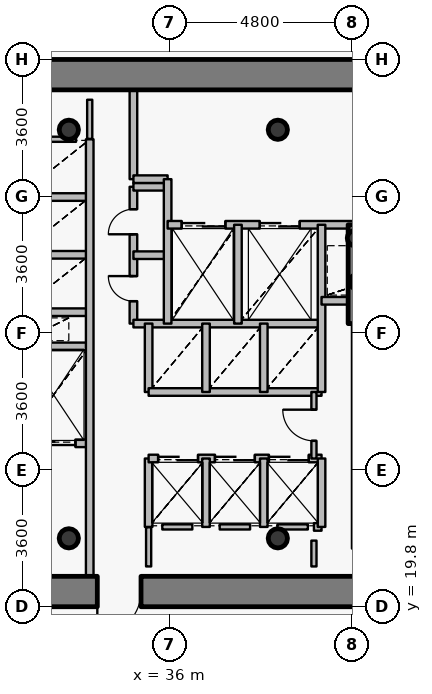
"""IFC4 building model, lengths in metres.
Left out: names, types, materials, properties, quantities, classifications, styles, units other than length and angle.
Written with IfcOpenShell. Run it as: python <this file> out.ifc"""

import sys

from ifc_helpers import new_model, si_unit, direction, frame, frame_2d, origin, origin_2d, place, context, subcontext, project, spatial, rectangle, hollow_circle, extrude, source, transform, mapped, element, fill, save


model = new_model("IFC4")
c1 = context("Model", 3, precision=1e-05, world=origin(), true_north=direction((0.0, 1.0)))
c2 = subcontext(c1, "Body", "Model", "MODEL_VIEW")
j1 = project(units=[si_unit("LENGTHUNIT", "METRE"), si_unit("PLANEANGLEUNIT", "RADIAN")], contexts=[c1])
p1 = place(None, origin())
s1 = spatial("IfcSite", under=j1, at=p1, CompositionType="ELEMENT")
p2 = place(p1, origin())
s2 = spatial("IfcBuilding", under=s1, at=p2, CompositionType="ELEMENT")
p3 = place(p2, frame((0.0, 0.0, 138.45)))
s3 = spatial("IfcBuildingStorey", under=s2, at=p3, CompositionType="ELEMENT", Elevation=138.45)
for number, where, z_axis, x_axis in (
    (1, (33.35, 21.6, 0.0), (0.0, 0.0, 1.0), (1.0, 0.0, 0.0)),
    (2, (38.85, 21.6, 0.0), (0.0, 0.0, 1.0), (1.0, 0.0, 0.0)),
    (3, (38.85, 32.35, 0.0), (0.0, 0.0, 1.0), (1.0, 0.0, 0.0)),
    (4, (33.35, 32.35, 0.0), (0.0, 0.0, 1.0), (1.0, 0.0, 0.0)),
):
    element("IfcColumn", number, at=place(p3, frame(where, z_axis=z_axis, x_axis=x_axis)), inside=s3, PredefinedType="COLUMN", context=c2, shape_type="SweptSolid", body=[
        extrude(hollow_circle(Radius=0.254, WallThickness=0.02, at=origin_2d()), origin(), (0.0, 0.0, 1.0), 3.75),
    ])
for number, where, z_axis, x_axis in (
    (5, (40.95, 28.35, 0.0), (0.0, 0.0, 1.0), (1.0, 0.0, 0.0)),
    (6, (40.88, 29.5, 0.0), (0.0, 0.0, 1.0), (1.0, 0.0, 0.0)),
):
    element("IfcColumn", number, at=place(p3, frame(where, z_axis=z_axis, x_axis=x_axis)), inside=s3, PredefinedType="COLUMN", context=c2, shape_type="SweptSolid", body=[
        extrude(hollow_circle(Radius=0.203, WallThickness=0.016, at=origin_2d()), origin(), (0.0, 0.0, 1.0), 3.75),
    ])
p4 = place(p3, frame((26.6, 33.8, 0.0), z_axis=(0.0, 0.0, 1.0), x_axis=(1.0, 0.0, 0.0)))
e7 = element("IfcWall", 7, at=p4, inside=s3, PredefinedType="SHEAR", context=c2, shape_type="SweptSolid", body=[
    extrude(rectangle(XDim=18.8, YDim=0.8, at=frame_2d((9.4, 0.0))), origin(), (0.0, 0.0, 1.0), 2.95),
])
p5 = place(p3, frame((45.4, 20.2, 0.0), z_axis=(0.0, 0.0, 1.0), x_axis=(-1.0, 0.0, 0.0)))
e8 = element("IfcWall", 8, at=p5, inside=s3, PredefinedType="SHEAR", context=c2, shape_type="SweptSolid", body=[
    extrude(rectangle(XDim=18.8, YDim=0.8, at=frame_2d((9.4, 0.0))), origin(), (0.0, 0.0, 1.0), 2.95),
])
p6 = place(p5, frame((10.15, 0.0, 0.0)))
e9 = element("IfcOpeningElement", 9, at=p6, cuts=e8, PredefinedType="OPENING", context=c2, shape_type="SweptSolid", body=[
    extrude(rectangle(XDim=1.15, YDim=2.15, at=origin_2d()), frame((0.575, 0.41, 1.075), z_axis=(0.0, -1.0, 0.0), x_axis=(1.0, 0.0, 0.0)), (0.0, 0.0, 1.0), 0.82),
])
p7 = place(p3, frame((40.9, 27.25, 0.0), z_axis=(0.0, 0.0, 1.0), x_axis=(0.0, 1.0, 0.0)))
e10 = element("IfcWall", 10, at=p7, inside=s3, PredefinedType="SHEAR", context=c2, shape_type="SweptSolid", body=[
    extrude(rectangle(XDim=2.6, YDim=0.4, at=frame_2d((1.3, 0.0))), origin(), (0.0, 0.0, 1.0), 3.1),
])
p8 = place(p3, frame((32.0, 24.1, 0.0), z_axis=(0.0, 0.0, 1.0), x_axis=(1.0, 0.0, 0.0)))
e11 = element("IfcWall", 11, at=p8, inside=s3, PredefinedType="PARTITIONING", context=c2, shape_type="SweptSolid", body=[
    extrude(rectangle(XDim=1.9, YDim=0.2, at=frame_2d((0.95, 0.0))), origin(), (0.0, 0.0, 1.0), 3.085),
])
p9 = place(p8, frame((0.375, 0.0, 0.0)))
e12 = element("IfcOpeningElement", 12, at=p9, cuts=e11, PredefinedType="OPENING", context=c2, shape_type="SweptSolid", body=[
    extrude(rectangle(XDim=1.15, YDim=2.15, at=origin_2d()), frame((0.575, 0.11, 1.075), z_axis=(0.0, -1.0, 0.0), x_axis=(1.0, 0.0, 0.0)), (0.0, 0.0, 1.0), 0.22),
])
for number, where, z_axis, x_axis in (
    (13, (32.0, 26.65, 0.0), (0.0, 0.0, 1.0), (1.0, 0.0, 0.0)),
    (14, (32.0, 27.55, 0.0), (0.0, 0.0, 1.0), (1.0, 0.0, 0.0)),
    (15, (32.0, 29.06, 0.0), (0.0, 0.0, 1.0), (1.0, 0.0, 0.0)),
    (16, (32.0, 30.58, 0.0), (0.0, 0.0, 1.0), (1.0, 0.0, 0.0)),
):
    element("IfcWall", number, at=place(p3, frame(where, z_axis=z_axis, x_axis=x_axis)), inside=s3, PredefinedType="PARTITIONING", context=c2, shape_type="SweptSolid", body=[
        extrude(rectangle(XDim=1.9, YDim=0.2, at=frame_2d((0.95, 0.0))), origin(), (0.0, 0.0, 1.0), 3.085),
    ])
p10 = place(p3, frame((33.9, 20.6, 0.0), z_axis=(0.0, 0.0, 1.0), x_axis=(0.0, 1.0, 0.0)))
e17 = element("IfcWall", 17, at=p10, inside=s3, PredefinedType="PARTITIONING", context=c2, shape_type="SweptSolid", body=[
    extrude(rectangle(XDim=11.5, YDim=0.2, at=frame_2d((5.75, 0.0))), origin(), (0.0, 0.0, 1.0), 3.085),
])
p11 = place(p3, frame((35.05, 27.25, 0.0), z_axis=(0.0, 0.0, 1.0), x_axis=(0.0, 1.0, 0.0)))
e18 = element("IfcWall", 18, at=p11, inside=s3, PredefinedType="PARTITIONING", context=c2, shape_type="SweptSolid", body=[
    extrude(rectangle(XDim=3.6, YDim=0.2, at=frame_2d((1.8, 0.0))), origin(), (0.0, 0.0, 1.0), 3.5),
])
p12 = place(p11, frame((0.59, 0.0, 0.0)))
e19 = element("IfcOpeningElement", 19, at=p12, cuts=e18, PredefinedType="OPENING", context=c2, shape_type="SweptSolid", body=[
    extrude(rectangle(XDim=0.66, YDim=2.05, at=origin_2d()), frame((0.33, 0.11, 1.025), z_axis=(0.0, -1.0, 0.0), x_axis=(1.0, 0.0, 0.0)), (0.0, 0.0, 1.0), 0.22),
])
p13 = place(p11, frame((2.35, 0.0, 0.0)))
e20 = element("IfcOpeningElement", 20, at=p13, cuts=e18, PredefinedType="OPENING", context=c2, shape_type="SweptSolid", body=[
    extrude(rectangle(XDim=0.66, YDim=2.05, at=origin_2d()), frame((0.33, 0.11, 1.025), z_axis=(0.0, -1.0, 0.0), x_axis=(1.0, 0.0, 0.0)), (0.0, 0.0, 1.0), 0.22),
])
p14 = place(p3, frame((35.05, 27.25, 0.0), z_axis=(0.0, 0.0, 1.0), x_axis=(1.0, 0.0, 0.0)))
e21 = element("IfcWall", 21, at=p14, inside=s3, PredefinedType="PARTITIONING", context=c2, shape_type="SweptSolid", body=[
    extrude(rectangle(XDim=4.95, YDim=0.2, at=frame_2d((2.475, 0.0))), origin(), (0.0, 0.0, 1.0), 3.085),
])
for number, where, z_axis, x_axis in (
    (22, (35.05, 29.05, 0.0), (0.0, 0.0, 1.0), (1.0, 0.0, 0.0)),
    (23, (35.05, 30.85, 0.0), (0.0, 0.0, 1.0), (1.0, 0.0, 0.0)),
):
    element("IfcWall", number, at=place(p3, frame(where, z_axis=z_axis, x_axis=x_axis)), inside=s3, PredefinedType="PARTITIONING", context=c2, shape_type="SweptSolid", body=[
        extrude(rectangle(XDim=0.9, YDim=0.2, at=frame_2d((0.45, 0.0))), origin(), (0.0, 0.0, 1.0), 3.5),
    ])
p15 = place(p3, frame((35.05, 31.05, 0.0), z_axis=(0.0, 0.0, 1.0), x_axis=(0.0, 1.0, 0.0)))
e24 = element("IfcWall", 24, at=p15, inside=s3, PredefinedType="PARTITIONING", context=c2, shape_type="SweptSolid", body=[
    extrude(rectangle(XDim=2.35, YDim=0.2, at=frame_2d((1.175, 0.0))), origin(), (0.0, 0.0, 1.0), 3.085),
])
p16 = place(p3, frame((35.05, 31.05, 0.0), z_axis=(0.0, 0.0, 1.0), x_axis=(1.0, 0.0, 0.0)))
e25 = element("IfcWall", 25, at=p16, inside=s3, PredefinedType="PARTITIONING", context=c2, shape_type="SweptSolid", body=[
    extrude(rectangle(XDim=0.9, YDim=0.2, at=frame_2d((0.45, 0.0))), origin(), (0.0, 0.0, 1.0), 3.5),
])
p17 = place(p3, frame((35.45, 21.9, 0.0), z_axis=(0.0, 0.0, 1.0), x_axis=(0.0, 1.0, 0.0)))
e26 = element("IfcWall", 26, at=p17, inside=s3, PredefinedType="PARTITIONING", context=c2, shape_type="SweptSolid", body=[
    extrude(rectangle(XDim=1.8, YDim=0.2, at=frame_2d((0.9, 0.0))), origin(), (0.0, 0.0, 1.0), 3.5),
])
p18 = place(p3, frame((35.45, 23.7, 0.0), z_axis=(0.0, 0.0, 1.0), x_axis=(1.0, 0.0, 0.0)))
e27 = element("IfcWall", 27, at=p18, inside=s3, PredefinedType="PARTITIONING", context=c2, shape_type="SweptSolid", body=[
    extrude(rectangle(XDim=4.55, YDim=0.2, at=frame_2d((2.275, 0.0))), origin(), (0.0, 0.0, 1.0), 3.085),
])
p19 = place(p18, frame((0.25, 0.0, 0.0)))
e28 = element("IfcOpeningElement", 28, at=p19, cuts=e27, PredefinedType="OPENING", context=c2, shape_type="SweptSolid", body=[
    extrude(rectangle(XDim=1.05, YDim=2.15, at=origin_2d()), frame((0.525, 0.11, 1.075), z_axis=(0.0, -1.0, 0.0), x_axis=(1.0, 0.0, 0.0)), (0.0, 0.0, 1.0), 0.22),
])
p20 = place(p18, frame((1.745, 0.0, 0.0)))
e29 = element("IfcOpeningElement", 29, at=p20, cuts=e27, PredefinedType="OPENING", context=c2, shape_type="SweptSolid", body=[
    extrude(rectangle(XDim=1.05, YDim=2.15, at=origin_2d()), frame((0.525, 0.11, 1.075), z_axis=(0.0, -1.0, 0.0), x_axis=(1.0, 0.0, 0.0)), (0.0, 0.0, 1.0), 0.22),
])
p21 = place(p18, frame((3.165, 0.0, 0.0)))
e30 = element("IfcOpeningElement", 30, at=p21, cuts=e27, PredefinedType="OPENING", context=c2, shape_type="SweptSolid", body=[
    extrude(rectangle(XDim=1.05, YDim=2.15, at=origin_2d()), frame((0.525, 0.11, 1.075), z_axis=(0.0, -1.0, 0.0), x_axis=(1.0, 0.0, 0.0)), (0.0, 0.0, 1.0), 0.22),
])
p22 = place(p3, frame((35.45, 25.45, 0.0), z_axis=(0.0, 0.0, 1.0), x_axis=(0.0, 1.0, 0.0)))
e31 = element("IfcWall", 31, at=p22, inside=s3, PredefinedType="PARTITIONING", context=c2, shape_type="SweptSolid", body=[
    extrude(rectangle(XDim=1.8, YDim=0.2, at=frame_2d((0.9, 0.0))), origin(), (0.0, 0.0, 1.0), 3.5),
])
p23 = place(p3, frame((35.45, 25.45, 0.0), z_axis=(0.0, 0.0, 1.0), x_axis=(1.0, 0.0, 0.0)))
e32 = element("IfcWall", 32, at=p23, inside=s3, PredefinedType="PARTITIONING", context=c2, shape_type="SweptSolid", body=[
    extrude(rectangle(XDim=4.55, YDim=0.2, at=frame_2d((2.275, 0.0))), origin(), (0.0, 0.0, 1.0), 3.085),
])
p24 = place(p3, frame((35.95, 27.25, 0.0), z_axis=(0.0, 0.0, 1.0), x_axis=(0.0, 1.0, 0.0)))
e33 = element("IfcWall", 33, at=p24, inside=s3, PredefinedType="PARTITIONING", context=c2, shape_type="SweptSolid", body=[
    extrude(rectangle(XDim=3.8, YDim=0.2, at=frame_2d((1.9, 0.0))), origin(), (0.0, 0.0, 1.0), 3.5),
])
p25 = place(p3, frame((35.95, 29.85, 0.0), z_axis=(0.0, 0.0, 1.0), x_axis=(1.0, 0.0, 0.0)))
e34 = element("IfcWall", 34, at=p25, inside=s3, PredefinedType="PARTITIONING", context=c2, shape_type="SweptSolid", body=[
    extrude(rectangle(XDim=8.49, YDim=0.2, at=frame_2d((4.245, 0.0))), origin(), (0.0, 0.0, 1.0), 3.085),
])
p26 = place(p25, frame((6.1, 0.0, 0.0)))
e35 = element("IfcOpeningElement", 35, at=p26, cuts=e34, PredefinedType="OPENING", context=c2, shape_type="SweptSolid", body=[
    extrude(rectangle(XDim=1.2, YDim=2.15, at=origin_2d()), frame((0.6, 0.11, 1.075), z_axis=(0.0, -1.0, 0.0), x_axis=(1.0, 0.0, 0.0)), (0.0, 0.0, 1.0), 0.22),
])
p27 = place(p25, frame((0.37, 0.0, 0.0)))
e36 = element("IfcOpeningElement", 36, at=p27, cuts=e34, PredefinedType="OPENING", context=c2, shape_type="SweptSolid", body=[
    extrude(rectangle(XDim=1.15, YDim=2.15, at=origin_2d()), frame((0.575, 0.11, 1.075), z_axis=(0.0, -1.0, 0.0), x_axis=(1.0, 0.0, 0.0)), (0.0, 0.0, 1.0), 0.22),
])
p28 = place(p25, frame((2.425, 0.0, 0.0)))
e37 = element("IfcOpeningElement", 37, at=p28, cuts=e34, PredefinedType="OPENING", context=c2, shape_type="SweptSolid", body=[
    extrude(rectangle(XDim=1.05, YDim=2.15, at=origin_2d()), frame((0.525, 0.11, 1.075), z_axis=(0.0, -1.0, 0.0), x_axis=(1.0, 0.0, 0.0)), (0.0, 0.0, 1.0), 0.22),
])
for number, where, z_axis, x_axis in (
    (38, (36.96, 21.9, 0.0), (0.0, 0.0, 1.0), (0.0, 1.0, 0.0)),
    (39, (36.96, 25.45, 0.0), (0.0, 0.0, 1.0), (0.0, 1.0, 0.0)),
):
    element("IfcWall", number, at=place(p3, frame(where, z_axis=z_axis, x_axis=x_axis)), inside=s3, PredefinedType="PARTITIONING", context=c2, shape_type="SweptSolid", body=[
        extrude(rectangle(XDim=1.8, YDim=0.2, at=frame_2d((0.9, 0.0))), origin(), (0.0, 0.0, 1.0), 3.5),
    ])
p29 = place(p3, frame((37.8, 27.25, 0.0), z_axis=(0.0, 0.0, 1.0), x_axis=(0.0, 1.0, 0.0)))
e40 = element("IfcWall", 40, at=p29, inside=s3, PredefinedType="PARTITIONING", context=c2, shape_type="SweptSolid", body=[
    extrude(rectangle(XDim=2.6, YDim=0.2, at=frame_2d((1.3, 0.0))), origin(), (0.0, 0.0, 1.0), 3.5),
])
for number, where, z_axis, x_axis in (
    (41, (38.48, 21.9, 0.0), (0.0, 0.0, 1.0), (0.0, 1.0, 0.0)),
    (42, (38.48, 25.45, 0.0), (0.0, 0.0, 1.0), (0.0, 1.0, 0.0)),
):
    element("IfcWall", number, at=place(p3, frame(where, z_axis=z_axis, x_axis=x_axis)), inside=s3, PredefinedType="PARTITIONING", context=c2, shape_type="SweptSolid", body=[
        extrude(rectangle(XDim=1.8, YDim=0.2, at=frame_2d((0.9, 0.0))), origin(), (0.0, 0.0, 1.0), 3.5),
    ])
p30 = place(p3, frame((39.8, 21.9, 0.0), z_axis=(0.0, 0.0, 1.0), x_axis=(1.0, 0.0, 0.0)))
e43 = element("IfcWall", 43, at=p30, inside=s3, PredefinedType="PARTITIONING", context=c2, shape_type="SweptSolid", body=[
    extrude(rectangle(XDim=0.2, YDim=0.2, at=frame_2d((0.1, 0.0))), origin(), (0.0, 0.0, 1.0), 3.5),
])
p31 = place(p3, frame((39.8, 23.7, 0.0), z_axis=(0.0, 0.0, 1.0), x_axis=(0.0, 1.0, 0.0)))
e44 = element("IfcWall", 44, at=p31, inside=s3, PredefinedType="PARTITIONING", context=c2, shape_type="SweptSolid", body=[
    extrude(rectangle(XDim=1.75, YDim=0.135, at=frame_2d((0.875, 0.0))), origin(), (0.0, 0.0, 1.0), 3.5),
])
p32 = place(p31, frame((0.465, 0.0, 0.0)))
e45 = element("IfcOpeningElement", 45, at=p32, cuts=e44, PredefinedType="OPENING", context=c2, shape_type="SweptSolid", body=[
    extrude(rectangle(XDim=0.82, YDim=2.1, at=origin_2d()), frame((0.41, 0.078, 1.05), z_axis=(0.0, -1.0, 0.0), x_axis=(1.0, 0.0, 0.0)), (0.0, 0.0, 1.0), 0.155),
])
p33 = place(p3, frame((40.0, 21.9, 0.0), z_axis=(0.0, 0.0, 1.0), x_axis=(0.0, 1.0, 0.0)))
e46 = element("IfcWall", 46, at=p33, inside=s3, PredefinedType="PARTITIONING", context=c2, shape_type="SweptSolid", body=[
    extrude(rectangle(XDim=1.8, YDim=0.2, at=frame_2d((0.9, 0.0))), origin(), (0.0, 0.0, 1.0), 3.5),
])
p34 = place(p3, frame((40.0, 25.45, 0.0), z_axis=(0.0, 0.0, 1.0), x_axis=(0.0, 1.0, 0.0)))
e47 = element("IfcWall", 47, at=p34, inside=s3, PredefinedType="PARTITIONING", context=c2, shape_type="SweptSolid", body=[
    extrude(rectangle(XDim=4.4, YDim=0.2, at=frame_2d((2.2, 0.0))), origin(), (0.0, 0.0, 1.0), 3.5),
])
p35 = place(p3, frame((40.0, 27.85, 0.0), z_axis=(0.0, 0.0, 1.0), x_axis=(1.0, 0.0, 0.0)))
e48 = element("IfcWall", 48, at=p35, inside=s3, PredefinedType="PARTITIONING", context=c2, shape_type="SweptSolid", body=[
    extrude(rectangle(XDim=0.9, YDim=0.2, at=frame_2d((0.45, 0.0))), origin(), (0.0, 0.0, 1.0), 3.5),
])
p36 = place(p3, frame((40.9, 21.33, 0.0), z_axis=(0.0, 0.0, 1.0), x_axis=(0.0, 1.0, 0.0)))
e49 = element("IfcWall", 49, at=p36, inside=s3, PredefinedType="PARTITIONING", context=c2, shape_type="SweptSolid", body=[
    extrude(rectangle(XDim=5.91, YDim=0.2, at=frame_2d((2.955, 0.0))), origin(), (0.0, 0.0, 1.0), 3.035),
])
p37 = place(p3, frame((36.6, 21.9, 0.0), z_axis=(0.0, 0.0, 1.0), x_axis=(-1.0, 0.0, 0.0)))
e50 = element("IfcWall", 50, at=p37, inside=s3, PredefinedType="PARTITIONING", context=c2, shape_type="SweptSolid", body=[
    extrude(rectangle(XDim=0.79, YDim=0.135, at=frame_2d((0.395, 0.0))), origin(), (0.0, 0.0, 1.0), 3.5),
])
p38 = place(p3, frame((38.12, 21.9, 0.0), z_axis=(0.0, 0.0, 1.0), x_axis=(-1.0, 0.0, 0.0)))
e51 = element("IfcWall", 51, at=p38, inside=s3, PredefinedType="PARTITIONING", context=c2, shape_type="SweptSolid", body=[
    extrude(rectangle(XDim=0.8, YDim=0.135, at=frame_2d((0.4, 0.0))), origin(), (0.0, 0.0, 1.0), 3.5),
])
p39 = place(p3, frame((39.64, 21.9, 0.0), z_axis=(0.0, 0.0, 1.0), x_axis=(-1.0, 0.0, 0.0)))
e52 = element("IfcWall", 52, at=p39, inside=s3, PredefinedType="PARTITIONING", context=c2, shape_type="SweptSolid", body=[
    extrude(rectangle(XDim=0.8, YDim=0.135, at=frame_2d((0.4, 0.0))), origin(), (0.0, 0.0, 1.0), 3.085),
])
p40 = place(p3, frame((32.36, 32.1, 0.0), z_axis=(0.0, 0.0, 1.0), x_axis=(1.0, 0.0, 0.0)))
e53 = element("IfcWall", 53, at=p40, inside=s3, PredefinedType="PARTITIONING", context=c2, shape_type="SweptSolid", body=[
    extrude(rectangle(XDim=1.18, YDim=0.135, at=frame_2d((0.59, 0.0))), origin(), (0.0, 0.0, 1.0), 3.085),
])
p41 = place(p3, frame((39.8, 20.86, 0.0), z_axis=(0.0, 0.0, 1.0), x_axis=(0.0, 1.0, 0.0)))
e54 = element("IfcWall", 54, at=p41, inside=s3, PredefinedType="PARTITIONING", context=c2, shape_type="SweptSolid", body=[
    extrude(rectangle(XDim=0.68, YDim=0.135, at=frame_2d((0.34, 0.0))), origin(), (0.0, 0.0, 1.0), 3.035),
])
for number, where, z_axis, x_axis in (
    (55, (35.45, 21.89, 0.0), (0.0, 0.0, 1.0), (0.0, -1.0, 0.0)),
    (56, (33.9, 32.11, 0.0), (0.0, 0.0, 1.0), (0.0, 1.0, 0.0)),
):
    element("IfcWall", number, at=place(p3, frame(where, z_axis=z_axis, x_axis=x_axis)), inside=s3, PredefinedType="PARTITIONING", context=c2, shape_type="SweptSolid", body=[
        extrude(rectangle(XDim=1.03, YDim=0.135, at=frame_2d((0.515, 0.0))), origin(), (0.0, 0.0, 1.0), 3.085),
    ])
m1 = source(origin(), c2, "Body", "SweptSolid", [
    extrude(rectangle(XDim=1.15, YDim=2.15, at=origin_2d()), frame((0.575, 0.025, 1.075), z_axis=(0.0, -1.0, 0.0), x_axis=(1.0, 0.0, 0.0)), (0.0, 0.0, 1.0), 0.05),
])
p42 = place(p6, origin())
e57 = element("IfcDoor", 57, at=p42, inside=s3, OperationType="SINGLE_SWING_RIGHT", PredefinedType="DOOR", context=c2, shape_type="MappedRepresentation", body=[
    mapped(m1, transform((0.0, 0.0, 0.0), x_axis=(1.0, 0.0, 0.0), y_axis=(0.0, 1.0, 0.0), z_axis=(0.0, 0.0, 1.0), scale=1.0)),
])
fill(e9, e57)
m2 = source(origin(), c2, "Body", "SweptSolid", [
    extrude(rectangle(XDim=1.15, YDim=2.15, at=origin_2d()), frame((0.575, 0.025, 1.075), z_axis=(0.0, -1.0, 0.0), x_axis=(1.0, 0.0, 0.0)), (0.0, 0.0, 1.0), 0.05),
])
p43 = place(p27, origin())
e58 = element("IfcDoor", 58, at=p43, inside=s3, OperationType="DOUBLE_DOOR_SLIDING", PredefinedType="USERDEFINED", context=c2, shape_type="MappedRepresentation", body=[
    mapped(m2, transform((0.0, 0.0, 0.0), x_axis=(1.0, 0.0, 0.0), y_axis=(0.0, 1.0, 0.0), z_axis=(0.0, 0.0, 1.0), scale=1.0)),
])
fill(e36, e58)
p44 = place(p9, origin())
e59 = element("IfcDoor", 59, at=p44, inside=s3, OperationType="DOUBLE_DOOR_SLIDING", PredefinedType="USERDEFINED", context=c2, shape_type="MappedRepresentation", body=[
    mapped(m2, transform((0.0, 0.0, 0.0), x_axis=(1.0, 0.0, 0.0), y_axis=(0.0, 1.0, 0.0), z_axis=(0.0, 0.0, 1.0), scale=1.0)),
])
fill(e12, e59)
m3 = source(origin(), c2, "Body", "SweptSolid", [
    extrude(rectangle(XDim=1.05, YDim=2.15, at=origin_2d()), frame((0.525, 0.025, 1.075), z_axis=(0.0, -1.0, 0.0), x_axis=(1.0, 0.0, 0.0)), (0.0, 0.0, 1.0), 0.05),
])
p45 = place(p28, origin())
e60 = element("IfcDoor", 60, at=p45, inside=s3, OperationType="DOUBLE_DOOR_SLIDING", PredefinedType="USERDEFINED", context=c2, shape_type="MappedRepresentation", body=[
    mapped(m3, transform((0.0, 0.0, 0.0), x_axis=(1.0, 0.0, 0.0), y_axis=(0.0, 1.0, 0.0), z_axis=(0.0, 0.0, 1.0), scale=1.0)),
])
fill(e37, e60)
p46 = place(p19, origin())
e61 = element("IfcDoor", 61, at=p46, inside=s3, OperationType="DOUBLE_DOOR_SLIDING", PredefinedType="USERDEFINED", context=c2, shape_type="MappedRepresentation", body=[
    mapped(m3, transform((0.0, 0.0, 0.0), x_axis=(1.0, 0.0, 0.0), y_axis=(0.0, 1.0, 0.0), z_axis=(0.0, 0.0, 1.0), scale=1.0)),
])
fill(e28, e61)
p47 = place(p20, origin())
e62 = element("IfcDoor", 62, at=p47, inside=s3, OperationType="DOUBLE_DOOR_SLIDING", PredefinedType="USERDEFINED", context=c2, shape_type="MappedRepresentation", body=[
    mapped(m3, transform((0.0, 0.0, 0.0), x_axis=(1.0, 0.0, 0.0), y_axis=(0.0, 1.0, 0.0), z_axis=(0.0, 0.0, 1.0), scale=1.0)),
])
fill(e29, e62)
p48 = place(p21, origin())
e63 = element("IfcDoor", 63, at=p48, inside=s3, OperationType="DOUBLE_DOOR_SLIDING", PredefinedType="USERDEFINED", context=c2, shape_type="MappedRepresentation", body=[
    mapped(m3, transform((0.0, 0.0, 0.0), x_axis=(1.0, 0.0, 0.0), y_axis=(0.0, 1.0, 0.0), z_axis=(0.0, 0.0, 1.0), scale=1.0)),
])
fill(e30, e63)
m4 = source(origin(), c2, "Body", "SweptSolid", [
    extrude(rectangle(XDim=0.66, YDim=2.05, at=origin_2d()), frame((0.33, 0.025, 1.025), z_axis=(0.0, -1.0, 0.0), x_axis=(1.0, 0.0, 0.0)), (0.0, 0.0, 1.0), 0.05),
])
p49 = place(p12, origin())
e64 = element("IfcDoor", 64, at=p49, inside=s3, OperationType="SINGLE_SWING_RIGHT", PredefinedType="USERDEFINED", context=c2, shape_type="MappedRepresentation", body=[
    mapped(m4, transform((0.0, 0.0, 0.0), x_axis=(1.0, 0.0, 0.0), y_axis=(0.0, 1.0, 0.0), z_axis=(0.0, 0.0, 1.0), scale=1.0)),
])
fill(e19, e64)
p50 = place(p13, origin())
e65 = element("IfcDoor", 65, at=p50, inside=s3, OperationType="SINGLE_SWING_LEFT", PredefinedType="USERDEFINED", context=c2, shape_type="MappedRepresentation", body=[
    mapped(m4, transform((0.0, 0.0, 0.0), x_axis=(1.0, 0.0, 0.0), y_axis=(0.0, 1.0, 0.0), z_axis=(0.0, 0.0, 1.0), scale=1.0)),
])
fill(e20, e65)
m5 = source(origin(), c2, "Body", "SweptSolid", [
    extrude(rectangle(XDim=0.82, YDim=2.1, at=origin_2d()), frame((0.41, 0.025, 1.05), z_axis=(0.0, -1.0, 0.0), x_axis=(1.0, 0.0, 0.0)), (0.0, 0.0, 1.0), 0.05),
])
p51 = place(p32, origin())
e66 = element("IfcDoor", 66, at=p51, inside=s3, OperationType="SINGLE_SWING_RIGHT", PredefinedType="DOOR", context=c2, shape_type="MappedRepresentation", body=[
    mapped(m5, transform((0.0, 0.0, 0.0), x_axis=(1.0, 0.0, 0.0), y_axis=(0.0, 1.0, 0.0), z_axis=(0.0, 0.0, 1.0), scale=1.0)),
])
fill(e45, e66)
save(model, sys.argv[1])
